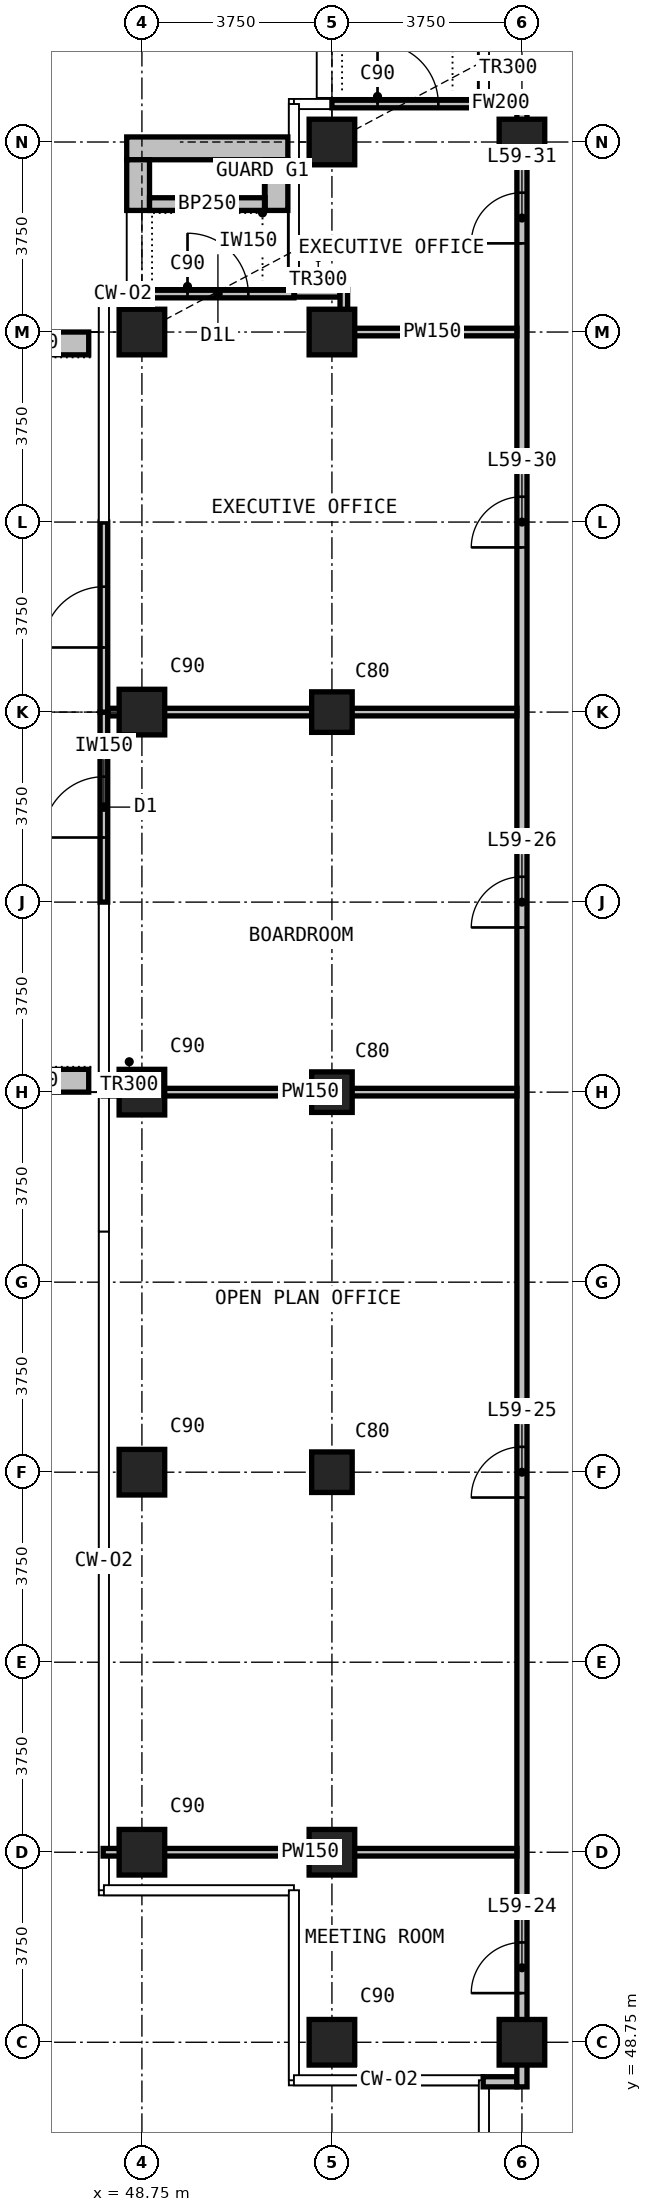
"""IFC4 building model, lengths in metres.
Left out: names, types, materials, properties, quantities, classifications, styles, units other than length and angle.
Written with IfcOpenShell. Run it as: python <this file> out.ifc"""

import sys

from ifc_helpers import new_model, si_unit, direction, frame, frame_2d, origin, origin_2d, place, context, subcontext, project, spatial, rectangle, extrude, element, fill, save


model = new_model("IFC4")
c1 = context("Model", 3, precision=1e-05, world=origin(), true_north=direction((0.0, 1.0)))
c2 = subcontext(c1, "Body", "Model", "MODEL_VIEW")
j1 = project(units=[si_unit("LENGTHUNIT", "METRE"), si_unit("PLANEANGLEUNIT", "RADIAN")], contexts=[c1])
p1 = place(None, origin())
s1 = spatial("IfcSite", under=j1, at=p1, CompositionType="ELEMENT")
p2 = place(p1, origin())
s2 = spatial("IfcBuilding", under=s1, at=p2, CompositionType="ELEMENT")
p3 = place(p2, frame((0.0, 0.0, 228.3)))
s3 = spatial("IfcBuildingStorey", under=s2, at=p3, CompositionType="ELEMENT", Elevation=228.3)
for number, where, z_axis, x_axis in (
    (1, (48.75, 52.5, 0.0), (0.0, 0.0, 1.0), (1.0, 0.0, 0.0)),
    (2, (48.75, 60.0, 0.0), (0.0, 0.0, 1.0), (1.0, 0.0, 0.0)),
    (3, (48.75, 67.5, 0.0), (0.0, 0.0, 1.0), (1.0, 0.0, 0.0)),
    (4, (48.75, 75.0, 0.0), (0.0, 0.0, 1.0), (1.0, 0.0, 0.0)),
    (5, (48.75, 82.5, 0.0), (0.0, 0.0, 1.0), (1.0, 0.0, 0.0)),
    (6, (52.5, 48.75, 0.0), (0.0, 0.0, 1.0), (1.0, 0.0, 0.0)),
    (7, (52.5, 52.5, 0.0), (0.0, 0.0, 1.0), (1.0, 0.0, 0.0)),
):
    element("IfcColumn", number, at=place(p3, frame(where, z_axis=z_axis, x_axis=x_axis)), inside=s3, PredefinedType="COLUMN", context=c2, shape_type="SweptSolid", body=[
        extrude(rectangle(XDim=0.9, YDim=0.9, at=origin_2d()), origin(), (0.0, 0.0, 1.0), 3.6),
    ])
for number, where, z_axis, x_axis in (
    (8, (52.5, 60.0, 0.0), (0.0, 0.0, 1.0), (1.0, 0.0, 0.0)),
    (9, (52.5, 67.5, 0.0), (0.0, 0.0, 1.0), (1.0, 0.0, 0.0)),
    (10, (52.5, 75.0, 0.0), (0.0, 0.0, 1.0), (1.0, 0.0, 0.0)),
):
    element("IfcColumn", number, at=place(p3, frame(where, z_axis=z_axis, x_axis=x_axis)), inside=s3, PredefinedType="COLUMN", context=c2, shape_type="SweptSolid", body=[
        extrude(rectangle(XDim=0.8, YDim=0.8, at=origin_2d()), origin(), (0.0, 0.0, 1.0), 3.6),
    ])
for number, where, z_axis, x_axis in (
    (11, (52.5, 82.5, 0.0), (0.0, 0.0, 1.0), (1.0, 0.0, 0.0)),
    (12, (52.5, 86.25, 0.0), (0.0, 0.0, 1.0), (1.0, 0.0, 0.0)),
    (13, (56.25, 48.75, 0.0), (0.0, 0.0, 1.0), (1.0, 0.0, 0.0)),
    (14, (56.25, 86.25, 0.0), (0.0, 0.0, 1.0), (1.0, 0.0, 0.0)),
):
    element("IfcColumn", number, at=place(p3, frame(where, z_axis=z_axis, x_axis=x_axis)), inside=s3, PredefinedType="COLUMN", context=c2, shape_type="SweptSolid", body=[
        extrude(rectangle(XDim=0.9, YDim=0.9, at=origin_2d()), origin(), (0.0, 0.0, 1.0), 3.6),
    ])
p4 = place(p3, frame((52.5, 87.0, 0.0), z_axis=(0.0, 0.0, 1.0), x_axis=(1.0, 0.0, 0.0)))
e15 = element("IfcWall", 15, at=p4, inside=s3, PredefinedType="SOLIDWALL", context=c2, shape_type="SweptSolid", body=[
    extrude(rectangle(XDim=3.0, YDim=0.15, at=frame_2d((1.5, 0.0))), origin(), (0.0, 0.0, 1.0), 3.3),
])
p5 = place(p4, frame((0.9, 0.0, 0.0)))
e16 = element("IfcOpeningElement", 16, at=p5, cuts=e15, PredefinedType="OPENING", context=c2, shape_type="SweptSolid", body=[
    extrude(rectangle(XDim=1.2, YDim=2.0, at=frame_2d((0.6, 1.0))), frame((0.0, 0.085, 0.0), z_axis=(0.0, -1.0, 0.0), x_axis=(1.0, 0.0, 0.0)), (0.0, 0.0, 1.0), 0.17),
])
p6 = place(p3, frame((48.75, 83.25, 0.0), z_axis=(0.0, 0.0, 1.0), x_axis=(1.0, 0.0, 0.0)))
e17 = element("IfcWall", 17, at=p6, inside=s3, PredefinedType="SOLIDWALL", context=c2, shape_type="SweptSolid", body=[
    extrude(rectangle(XDim=3.0, YDim=0.15, at=frame_2d((1.5, 0.0))), origin(), (0.0, 0.0, 1.0), 3.3),
])
p7 = place(p6, frame((0.9, 0.0, 0.0)))
e18 = element("IfcOpeningElement", 18, at=p7, cuts=e17, PredefinedType="OPENING", context=c2, shape_type="SweptSolid", body=[
    extrude(rectangle(XDim=1.2, YDim=2.0, at=frame_2d((0.6, 1.0))), frame((0.0, 0.085, 0.0), z_axis=(0.0, -1.0, 0.0), x_axis=(1.0, 0.0, 0.0)), (0.0, 0.0, 1.0), 0.17),
])
p8 = place(p3, frame((48.0, 71.25, 0.0), z_axis=(0.0, 0.0, 1.0), x_axis=(0.0, 1.0, 0.0)))
e19 = element("IfcWall", 19, at=p8, inside=s3, PredefinedType="SOLIDWALL", context=c2, shape_type="SweptSolid", body=[
    extrude(rectangle(XDim=3.75, YDim=0.15, at=frame_2d((1.875, 0.0))), origin(), (0.0, 0.0, 1.0), 3.3),
])
p9 = place(p8, frame((1.275, 0.0, 0.0)))
e20 = element("IfcOpeningElement", 20, at=p9, cuts=e19, PredefinedType="OPENING", context=c2, shape_type="SweptSolid", body=[
    extrude(rectangle(XDim=1.2, YDim=2.4, at=frame_2d((0.6, 1.2))), frame((0.0, 0.085, 0.0), z_axis=(0.0, -1.0, 0.0), x_axis=(1.0, 0.0, 0.0)), (0.0, 0.0, 1.0), 0.17),
])
p10 = place(p3, frame((48.0, 75.0, 0.0), z_axis=(0.0, 0.0, 1.0), x_axis=(0.0, 1.0, 0.0)))
e21 = element("IfcWall", 21, at=p10, inside=s3, PredefinedType="SOLIDWALL", context=c2, shape_type="SweptSolid", body=[
    extrude(rectangle(XDim=3.75, YDim=0.15, at=frame_2d((1.875, 0.0))), origin(), (0.0, 0.0, 1.0), 3.3),
])
p11 = place(p10, frame((1.275, 0.0, 0.0)))
e22 = element("IfcOpeningElement", 22, at=p11, cuts=e21, PredefinedType="OPENING", context=c2, shape_type="SweptSolid", body=[
    extrude(rectangle(XDim=1.2, YDim=2.4, at=frame_2d((0.6, 1.2))), frame((0.0, 0.085, 0.0), z_axis=(0.0, -1.0, 0.0), x_axis=(1.0, 0.0, 0.0)), (0.0, 0.0, 1.0), 0.17),
])
p12 = place(p3, frame((48.45, 86.125, 0.0), z_axis=(0.0, 0.0, 1.0), x_axis=(1.0, 0.0, 0.0)))
e23 = element("IfcWall", 23, at=p12, inside=s3, PredefinedType="USERDEFINED", context=c2, shape_type="SweptSolid", body=[
    extrude(rectangle(XDim=3.18, YDim=0.45, at=frame_2d((1.59, 0.0))), origin(), (0.0, 0.0, 1.0), 1.1),
])
for number, where, z_axis, x_axis in (
    (24, (48.675, 84.9, 0.0), (0.0, 0.0, 1.0), (0.0, 1.0, 0.0)),
    (25, (51.405, 84.9, 0.0), (0.0, 0.0, 1.0), (0.0, 1.0, 0.0)),
):
    element("IfcWall", number, at=place(p3, frame(where, z_axis=z_axis, x_axis=x_axis)), inside=s3, PredefinedType="USERDEFINED", context=c2, shape_type="SweptSolid", body=[
        extrude(rectangle(XDim=1.0, YDim=0.45, at=frame_2d((0.5, 0.0))), origin(), (0.0, 0.0, 1.0), 1.1),
    ])
p13 = place(p3, frame((48.9, 85.025, 0.0), z_axis=(0.0, 0.0, 1.0), x_axis=(1.0, 0.0, 0.0)))
e26 = element("IfcWall", 26, at=p13, inside=s3, PredefinedType="USERDEFINED", context=c2, shape_type="SweptSolid", body=[
    extrude(rectangle(XDim=2.28, YDim=0.25, at=frame_2d((1.14, 0.0))), origin(), (0.0, 0.0, 1.0), 1.0),
])
for number, where, z_axis, x_axis in (
    (27, (47.7, 67.725, 0.0), (0.0, 0.0, 1.0), (-1.0, 0.0, 0.0)),
    (28, (47.7, 82.275, 0.0), (0.0, 0.0, 1.0), (-1.0, 0.0, 0.0)),
):
    element("IfcWall", number, at=place(p3, frame(where, z_axis=z_axis, x_axis=x_axis)), inside=s3, PredefinedType="USERDEFINED", context=c2, shape_type="SweptSolid", body=[
        extrude(rectangle(XDim=2.35, YDim=0.45, at=frame_2d((1.175, 0.0))), origin(), (0.0, 0.0, 1.0), 1.1),
    ])
p14 = place(p3, frame((55.485, 47.97, 0.0), z_axis=(0.0, 0.0, 1.0), x_axis=(1.0, 0.0, 0.0)))
e29 = element("IfcWall", 29, at=p14, inside=s3, PredefinedType="PARTITIONING", context=c2, shape_type="SweptSolid", body=[
    extrude(rectangle(XDim=0.665, YDim=0.2, at=frame_2d((0.333, 0.0))), origin(), (0.0, 0.0, 1.0), 3.3),
])
p15 = place(p3, frame((55.51, 87.03, 0.0), z_axis=(0.0, 0.0, 1.0), x_axis=(1.0, 0.0, 0.0)))
e30 = element("IfcWall", 30, at=p15, inside=s3, PredefinedType="PARTITIONING", context=c2, shape_type="SweptSolid", body=[
    extrude(rectangle(XDim=0.64, YDim=0.2, at=frame_2d((0.32, 0.0))), origin(), (0.0, 0.0, 1.0), 3.3),
])
p16 = place(p3, frame((56.25, 47.87, 0.0), z_axis=(0.0, 0.0, 1.0), x_axis=(0.0, 1.0, 0.0)))
e31 = element("IfcWall", 31, at=p16, inside=s3, PredefinedType="PARTITIONING", context=c2, shape_type="SweptSolid", body=[
    extrude(rectangle(XDim=39.26, YDim=0.2, at=frame_2d((19.63, 0.0))), origin(), (0.0, 0.0, 1.0), 3.3),
])
p17 = place(p16, frame((1.85, 0.0, 0.0)))
e32 = element("IfcOpeningElement", 32, at=p17, cuts=e31, PredefinedType="OPENING", context=c2, shape_type="SweptSolid", body=[
    extrude(rectangle(XDim=1.0, YDim=2.2, at=frame_2d((0.5, 1.1))), frame((0.0, 0.11, 0.0), z_axis=(0.0, -1.0, 0.0), x_axis=(1.0, 0.0, 0.0)), (0.0, 0.0, 1.0), 0.22),
])
p18 = place(p16, frame((11.63, 0.0, 0.0)))
e33 = element("IfcOpeningElement", 33, at=p18, cuts=e31, PredefinedType="OPENING", context=c2, shape_type="SweptSolid", body=[
    extrude(rectangle(XDim=1.0, YDim=2.2, at=frame_2d((0.5, 1.1))), frame((0.0, 0.11, 0.0), z_axis=(0.0, -1.0, 0.0), x_axis=(1.0, 0.0, 0.0)), (0.0, 0.0, 1.0), 0.22),
])
p19 = place(p16, frame((22.88, 0.0, 0.0)))
e34 = element("IfcOpeningElement", 34, at=p19, cuts=e31, PredefinedType="OPENING", context=c2, shape_type="SweptSolid", body=[
    extrude(rectangle(XDim=1.0, YDim=2.2, at=frame_2d((0.5, 1.1))), frame((0.0, 0.11, 0.0), z_axis=(0.0, -1.0, 0.0), x_axis=(1.0, 0.0, 0.0)), (0.0, 0.0, 1.0), 0.22),
])
p20 = place(p16, frame((30.38, 0.0, 0.0)))
e35 = element("IfcOpeningElement", 35, at=p20, cuts=e31, PredefinedType="OPENING", context=c2, shape_type="SweptSolid", body=[
    extrude(rectangle(XDim=1.0, YDim=2.2, at=frame_2d((0.5, 1.1))), frame((0.0, 0.11, 0.0), z_axis=(0.0, -1.0, 0.0), x_axis=(1.0, 0.0, 0.0)), (0.0, 0.0, 1.0), 0.22),
])
p21 = place(p16, frame((36.38, 0.0, 0.0)))
e36 = element("IfcOpeningElement", 36, at=p21, cuts=e31, PredefinedType="OPENING", context=c2, shape_type="SweptSolid", body=[
    extrude(rectangle(XDim=1.0, YDim=2.2, at=frame_2d((0.5, 1.1))), frame((0.0, 0.11, 0.0), z_axis=(0.0, -1.0, 0.0), x_axis=(1.0, 0.0, 0.0)), (0.0, 0.0, 1.0), 0.22),
])
for number, where, z_axis, x_axis in (
    (37, (47.985, 52.5, 0.0), (0.0, 0.0, 1.0), (1.0, 0.0, 0.0)),
    (38, (47.985, 67.5, 0.0), (0.0, 0.0, 1.0), (1.0, 0.0, 0.0)),
):
    element("IfcWall", number, at=place(p3, frame(where, z_axis=z_axis, x_axis=x_axis)), inside=s3, PredefinedType="PARTITIONING", context=c2, shape_type="SweptSolid", body=[
        extrude(rectangle(XDim=8.165, YDim=0.15, at=frame_2d((4.083, 0.0))), origin(), (0.0, 0.0, 1.0), 3.3),
    ])
p22 = place(p3, frame((48.085, 75.0, 0.0), z_axis=(0.0, 0.0, 1.0), x_axis=(1.0, 0.0, 0.0)))
e39 = element("IfcWall", 39, at=p22, inside=s3, PredefinedType="PARTITIONING", context=c2, shape_type="SweptSolid", body=[
    extrude(rectangle(XDim=8.065, YDim=0.15, at=frame_2d((4.032, 0.0))), origin(), (0.0, 0.0, 1.0), 3.3),
])
p23 = place(p3, frame((52.81, 82.5, 0.0), z_axis=(0.0, 0.0, 1.0), x_axis=(1.0, 0.0, 0.0)))
e40 = element("IfcWall", 40, at=p23, inside=s3, PredefinedType="PARTITIONING", context=c2, shape_type="SweptSolid", body=[
    extrude(rectangle(XDim=3.34, YDim=0.15, at=frame_2d((1.67, 0.0))), origin(), (0.0, 0.0, 1.0), 3.3),
])
p24 = place(p3, frame((51.76, 83.265, 0.0), z_axis=(0.0, 0.0, 1.0), x_axis=(1.0, 0.0, 0.0)))
e41 = element("IfcWall", 41, at=p24, inside=s3, PredefinedType="PARTITIONING", context=c2, shape_type="SweptSolid", body=[
    extrude(rectangle(XDim=0.9, YDim=0.15, at=frame_2d((0.45, 0.0))), origin(), (0.0, 0.0, 1.0), 3.3),
])
p25 = place(p3, frame((52.735, 82.425, 0.0), z_axis=(0.0, 0.0, 1.0), x_axis=(0.0, 1.0, 0.0)))
e42 = element("IfcWall", 42, at=p25, inside=s3, PredefinedType="PARTITIONING", context=c2, shape_type="SweptSolid", body=[
    extrude(rectangle(XDim=0.915, YDim=0.15, at=frame_2d((0.458, 0.0))), origin(), (0.0, 0.0, 1.0), 3.3),
])
p26 = place(p5, origin())
e43 = element("IfcDoor", 43, at=p26, inside=s3, OperationType="SINGLE_SWING_LEFT", PredefinedType="DOOR", context=c2, shape_type="SweptSolid", body=[
    extrude(rectangle(XDim=1.2, YDim=2.0, at=frame_2d((0.6, 1.0))), frame((0.0, 0.025, 0.0), z_axis=(0.0, -1.0, 0.0), x_axis=(1.0, 0.0, 0.0)), (0.0, 0.0, 1.0), 0.05),
])
fill(e16, e43)
p27 = place(p7, origin())
e44 = element("IfcDoor", 44, at=p27, inside=s3, OperationType="SINGLE_SWING_LEFT", PredefinedType="DOOR", context=c2, shape_type="SweptSolid", body=[
    extrude(rectangle(XDim=1.2, YDim=2.0, at=frame_2d((0.6, 1.0))), frame((0.0, 0.025, 0.0), z_axis=(0.0, -1.0, 0.0), x_axis=(1.0, 0.0, 0.0)), (0.0, 0.0, 1.0), 0.05),
])
fill(e18, e44)
p28 = place(p9, origin())
e45 = element("IfcDoor", 45, at=p28, inside=s3, OperationType="SINGLE_SWING_LEFT", PredefinedType="DOOR", context=c2, shape_type="SweptSolid", body=[
    extrude(rectangle(XDim=1.2, YDim=2.4, at=frame_2d((0.6, 1.2))), frame((0.0, 0.025, 0.0), z_axis=(0.0, -1.0, 0.0), x_axis=(1.0, 0.0, 0.0)), (0.0, 0.0, 1.0), 0.05),
])
fill(e20, e45)
p29 = place(p11, origin())
e46 = element("IfcDoor", 46, at=p29, inside=s3, OperationType="SINGLE_SWING_LEFT", PredefinedType="DOOR", context=c2, shape_type="SweptSolid", body=[
    extrude(rectangle(XDim=1.2, YDim=2.4, at=frame_2d((0.6, 1.2))), frame((0.0, 0.025, 0.0), z_axis=(0.0, -1.0, 0.0), x_axis=(1.0, 0.0, 0.0)), (0.0, 0.0, 1.0), 0.05),
])
fill(e22, e46)
p30 = place(p17, origin())
e47 = element("IfcDoor", 47, at=p30, inside=s3, OperationType="SINGLE_SWING_RIGHT", PredefinedType="DOOR", context=c2, shape_type="SweptSolid", body=[
    extrude(rectangle(XDim=1.0, YDim=2.2, at=frame_2d((0.5, 1.1))), frame((0.0, 0.025, 0.0), z_axis=(0.0, -1.0, 0.0), x_axis=(1.0, 0.0, 0.0)), (0.0, 0.0, 1.0), 0.05),
])
fill(e32, e47)
p31 = place(p18, origin())
e48 = element("IfcDoor", 48, at=p31, inside=s3, OperationType="SINGLE_SWING_RIGHT", PredefinedType="DOOR", context=c2, shape_type="SweptSolid", body=[
    extrude(rectangle(XDim=1.0, YDim=2.2, at=frame_2d((0.5, 1.1))), frame((0.0, 0.025, 0.0), z_axis=(0.0, -1.0, 0.0), x_axis=(1.0, 0.0, 0.0)), (0.0, 0.0, 1.0), 0.05),
])
fill(e33, e48)
p32 = place(p19, origin())
e49 = element("IfcDoor", 49, at=p32, inside=s3, OperationType="SINGLE_SWING_LEFT", PredefinedType="DOOR", context=c2, shape_type="SweptSolid", body=[
    extrude(rectangle(XDim=1.0, YDim=2.2, at=frame_2d((0.5, 1.1))), frame((0.0, 0.025, 0.0), z_axis=(0.0, -1.0, 0.0), x_axis=(1.0, 0.0, 0.0)), (0.0, 0.0, 1.0), 0.05),
])
fill(e34, e49)
p33 = place(p20, origin())
e50 = element("IfcDoor", 50, at=p33, inside=s3, OperationType="SINGLE_SWING_LEFT", PredefinedType="DOOR", context=c2, shape_type="SweptSolid", body=[
    extrude(rectangle(XDim=1.0, YDim=2.2, at=frame_2d((0.5, 1.1))), frame((0.0, 0.025, 0.0), z_axis=(0.0, -1.0, 0.0), x_axis=(1.0, 0.0, 0.0)), (0.0, 0.0, 1.0), 0.05),
])
fill(e35, e50)
p34 = place(p21, origin())
e51 = element("IfcDoor", 51, at=p34, inside=s3, OperationType="SINGLE_SWING_RIGHT", PredefinedType="DOOR", context=c2, shape_type="SweptSolid", body=[
    extrude(rectangle(XDim=1.0, YDim=2.2, at=frame_2d((0.5, 1.1))), frame((0.0, 0.025, 0.0), z_axis=(0.0, -1.0, 0.0), x_axis=(1.0, 0.0, 0.0)), (0.0, 0.0, 1.0), 0.05),
])
fill(e36, e51)
save(model, sys.argv[1])
